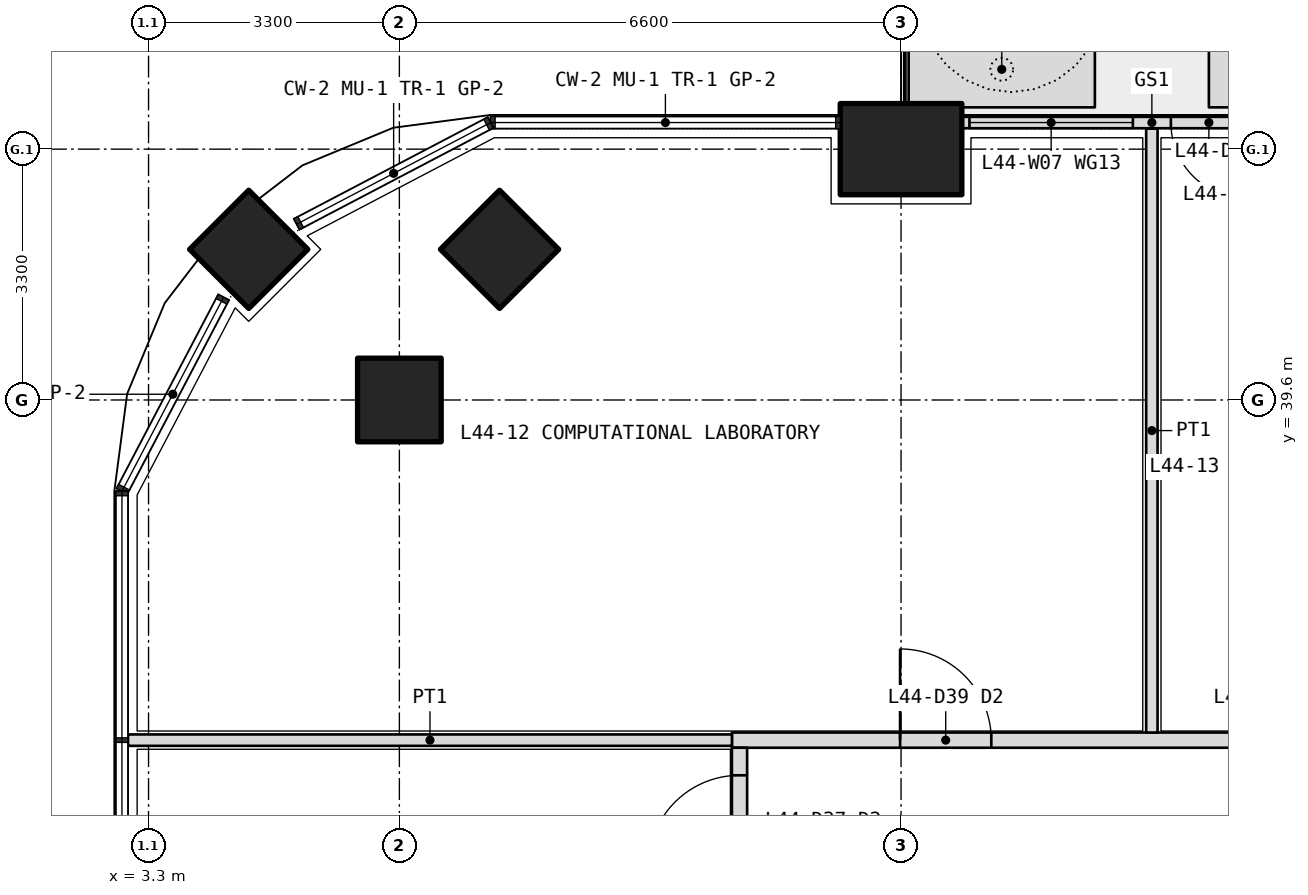
"""IFC4 building model, lengths in metres.
Left out: names, types, materials, properties, quantities, classifications, styles, units other than length and angle.
Written with IfcOpenShell. Run it as: python <this file> out.ifc"""

import sys

from ifc_helpers import new_model, si_unit, direction, frame, frame_2d, origin, origin_2d, place, context, subcontext, project, spatial, polyline, rectangle, outline, extrude, element, fill, save


model = new_model("IFC4")
c1 = context("Model", 3, precision=1e-05, world=origin(), true_north=direction((0.0, 1.0)))
c2 = subcontext(c1, "Body", "Model", "MODEL_VIEW")
j1 = project(units=[si_unit("LENGTHUNIT", "METRE"), si_unit("PLANEANGLEUNIT", "RADIAN")], contexts=[c1])
p1 = place(None, origin())
s1 = spatial("IfcSite", under=j1, at=p1, CompositionType="ELEMENT")
p2 = place(p1, origin())
s2 = spatial("IfcBuilding", under=s1, at=p2, CompositionType="ELEMENT")
p3 = place(p2, frame((0.0, 0.0, 193.5)))
s3 = spatial("IfcBuildingStorey", under=s2, at=p3, CompositionType="ELEMENT", Elevation=193.5)
p4 = place(p3, frame((4.618, 41.582, 0.0), z_axis=(0.0, 0.0, 1.0), x_axis=(0.707106781187, 0.707106781187, 0.0)))
e1 = element("IfcColumn", 1, at=p4, inside=s3, PredefinedType="COLUMN", context=c2, shape_type="SweptSolid", body=[
    extrude(rectangle(XDim=1.1, YDim=1.1, at=origin_2d()), origin(), (0.0, 0.0, 1.0), 4.2),
])
p5 = place(p3, frame((13.2, 42.9, 0.0), z_axis=(0.0, 0.0, 1.0), x_axis=(1.0, 0.0, 0.0)))
e2 = element("IfcColumn", 2, at=p5, inside=s3, PredefinedType="COLUMN", context=c2, shape_type="SweptSolid", body=[
    extrude(rectangle(XDim=1.6, YDim=1.2, at=origin_2d()), origin(), (0.0, 0.0, 1.0), 4.2),
])
for number, where, z_axis, x_axis in (
    (3, (6.6, 39.6, 0.0), (0.0, 0.0, 1.0), (1.0, 0.0, 0.0)),
    (4, (7.918, 41.582, 0.0), (0.0, 0.0, 1.0), (0.707, 0.707, 0.0)),
):
    element("IfcColumn", number, at=place(p3, frame(where, z_axis=z_axis, x_axis=x_axis)), inside=s3, PredefinedType="COLUMN", context=c2, shape_type="SweptSolid", body=[
        extrude(rectangle(XDim=1.1, YDim=1.1, at=origin_2d()), origin(), (0.0, 0.0, 1.0), 4.2),
    ])
p6 = place(p3, origin())
e5 = element("IfcWall", 5, at=p6, inside=s3, PredefinedType="USERDEFINED", context=c2, shape_type="SweptSolid", body=[
    extrude(outline(polyline([(13.3, 43.45), (15.75, 43.45), (15.75, 44.45), (13.3, 44.45), (13.3, 43.45)]), holes=[polyline([(13.45, 43.6), (15.6, 43.6), (15.6, 44.3), (13.45, 44.3), (13.45, 43.6)])]), origin(), (0.0, 0.0, 1.0), 1.05),
])
p7 = place(p3, origin())
e6 = element("IfcWall", 6, at=p7, inside=s3, PredefinedType="USERDEFINED", context=c2, shape_type="SweptSolid", body=[
    extrude(outline(polyline([(17.25, 43.45), (26.3, 43.45), (26.3, 44.45), (17.25, 44.45), (17.25, 43.45)]), holes=[polyline([(17.4, 43.6), (26.15, 43.6), (26.15, 44.3), (17.4, 44.3), (17.4, 43.6)])]), origin(), (0.0, 0.0, 1.0), 1.05),
])
p8 = place(p3, frame((19.0, 43.25, 0.0), z_axis=(0.0, 0.0, 1.0), x_axis=(-1.0, 0.0, 0.0)))
e7 = element("IfcWall", 7, at=p8, inside=s3, PredefinedType="SOLIDWALL", context=c2, shape_type="SweptSolid", body=[
    extrude(rectangle(XDim=5.0, YDim=0.15, at=frame_2d((2.5, 0.0))), origin(), (0.0, 0.0, 1.0), 2.7),
])
p9 = place(p8, frame((1.25, 0.0, 0.0)))
e8 = element("IfcOpeningElement", 8, at=p9, cuts=e7, PredefinedType="OPENING", context=c2, shape_type="SweptSolid", body=[
    extrude(rectangle(XDim=1.0, YDim=2.4, at=frame_2d((0.5, 1.2))), frame((0.0, 0.085, 0.0), z_axis=(0.0, -1.0, 0.0), x_axis=(1.0, 0.0, 0.0)), (0.0, 0.0, 1.0), 0.17),
])
p10 = place(p8, frame((0.1, 0.0, 0.1)))
e9 = element("IfcOpeningElement", 9, at=p10, cuts=e7, PredefinedType="OPENING", context=c2, shape_type="SweptSolid", body=[
    extrude(rectangle(XDim=1.05, YDim=2.3, at=frame_2d((0.525, 1.15))), frame((0.0, 0.085, 0.0), z_axis=(0.0, -1.0, 0.0), x_axis=(1.0, 0.0, 0.0)), (0.0, 0.0, 1.0), 0.17),
])
p11 = place(p8, frame((2.75, 0.0, 0.1)))
e10 = element("IfcOpeningElement", 10, at=p11, cuts=e7, PredefinedType="OPENING", context=c2, shape_type="SweptSolid", body=[
    extrude(rectangle(XDim=2.15, YDim=2.3, at=frame_2d((1.075, 1.15))), frame((0.0, 0.085, 0.0), z_axis=(0.0, -1.0, 0.0), x_axis=(1.0, 0.0, 0.0)), (0.0, 0.0, 1.0), 0.17),
])
p12 = place(p3, frame((10.975, 35.125, 0.0), z_axis=(0.0, 0.0, 1.0), x_axis=(1.0, 0.0, 0.0)))
e11 = element("IfcWall", 11, at=p12, inside=s3, PredefinedType="PARTITIONING", context=c2, shape_type="SweptSolid", body=[
    extrude(rectangle(XDim=30.85, YDim=0.2, at=frame_2d((15.425, 0.0))), origin(), (0.0, 0.0, 1.0), 2.85),
])
p13 = place(p12, frame((2.212, 0.0, 0.0)))
e12 = element("IfcOpeningElement", 12, at=p13, cuts=e11, PredefinedType="OPENING", context=c2, shape_type="SweptSolid", body=[
    extrude(rectangle(XDim=1.2, YDim=2.1, at=frame_2d((0.6, 1.05))), frame((0.0, 0.11, 0.0), z_axis=(0.0, -1.0, 0.0), x_axis=(1.0, 0.0, 0.0)), (0.0, 0.0, 1.0), 0.22),
])
p14 = place(p12, frame((6.675, 0.0, 0.0)))
e13 = element("IfcOpeningElement", 13, at=p14, cuts=e11, PredefinedType="OPENING", context=c2, shape_type="SweptSolid", body=[
    extrude(rectangle(XDim=1.0, YDim=2.1, at=frame_2d((0.5, 1.05))), frame((0.0, 0.11, 0.0), z_axis=(0.0, -1.0, 0.0), x_axis=(1.0, 0.0, 0.0)), (0.0, 0.0, 1.0), 0.22),
])
p15 = place(p12, frame((14.925, 0.0, 0.0)))
e14 = element("IfcOpeningElement", 14, at=p15, cuts=e11, PredefinedType="OPENING", context=c2, shape_type="SweptSolid", body=[
    extrude(rectangle(XDim=1.0, YDim=2.1, at=frame_2d((0.5, 1.05))), frame((0.0, 0.11, 0.0), z_axis=(0.0, -1.0, 0.0), x_axis=(1.0, 0.0, 0.0)), (0.0, 0.0, 1.0), 0.22),
])
p16 = place(p12, frame((25.788, 0.0, 0.0)))
e15 = element("IfcOpeningElement", 15, at=p16, cuts=e11, PredefinedType="OPENING", context=c2, shape_type="SweptSolid", body=[
    extrude(rectangle(XDim=1.2, YDim=2.1, at=frame_2d((0.6, 1.05))), frame((0.0, 0.11, 0.0), z_axis=(0.0, -1.0, 0.0), x_axis=(1.0, 0.0, 0.0)), (0.0, 0.0, 1.0), 0.22),
])
p17 = place(p3, frame((11.075, 11.175, 0.0), z_axis=(0.0, 0.0, 1.0), x_axis=(0.0, 1.0, 0.0)))
e16 = element("IfcWall", 16, at=p17, inside=s3, PredefinedType="PARTITIONING", context=c2, shape_type="SweptSolid", body=[
    extrude(rectangle(XDim=23.85, YDim=0.2, at=frame_2d((11.925, 0.0))), origin(), (0.0, 0.0, 1.0), 2.85),
])
p18 = place(p17, frame((0.462, 0.0, 0.0)))
e17 = element("IfcOpeningElement", 17, at=p18, cuts=e16, PredefinedType="OPENING", context=c2, shape_type="SweptSolid", body=[
    extrude(rectangle(XDim=1.0, YDim=2.1, at=frame_2d((0.5, 1.05))), frame((0.0, 0.11, 0.0), z_axis=(0.0, -1.0, 0.0), x_axis=(1.0, 0.0, 0.0)), (0.0, 0.0, 1.0), 0.22),
])
p19 = place(p17, frame((3.125, 0.0, 0.0)))
e18 = element("IfcOpeningElement", 18, at=p19, cuts=e16, PredefinedType="OPENING", context=c2, shape_type="SweptSolid", body=[
    extrude(rectangle(XDim=1.0, YDim=2.1, at=frame_2d((0.5, 1.05))), frame((0.0, 0.11, 0.0), z_axis=(0.0, -1.0, 0.0), x_axis=(1.0, 0.0, 0.0)), (0.0, 0.0, 1.0), 0.22),
])
p20 = place(p17, frame((6.475, 0.0, 0.0)))
e19 = element("IfcOpeningElement", 19, at=p20, cuts=e16, PredefinedType="OPENING", context=c2, shape_type="SweptSolid", body=[
    extrude(rectangle(XDim=0.9, YDim=2.1, at=frame_2d((0.45, 1.05))), frame((0.0, 0.11, 0.0), z_axis=(0.0, -1.0, 0.0), x_axis=(1.0, 0.0, 0.0)), (0.0, 0.0, 1.0), 0.22),
])
p21 = place(p17, frame((9.675, 0.0, 0.0)))
e20 = element("IfcOpeningElement", 20, at=p21, cuts=e16, PredefinedType="OPENING", context=c2, shape_type="SweptSolid", body=[
    extrude(rectangle(XDim=0.9, YDim=2.1, at=frame_2d((0.45, 1.05))), frame((0.0, 0.11, 0.0), z_axis=(0.0, -1.0, 0.0), x_axis=(1.0, 0.0, 0.0)), (0.0, 0.0, 1.0), 0.22),
])
p22 = place(p17, frame((12.925, 0.0, 0.0)))
e21 = element("IfcOpeningElement", 21, at=p22, cuts=e16, PredefinedType="OPENING", context=c2, shape_type="SweptSolid", body=[
    extrude(rectangle(XDim=1.0, YDim=2.1, at=frame_2d((0.5, 1.05))), frame((0.0, 0.11, 0.0), z_axis=(0.0, -1.0, 0.0), x_axis=(1.0, 0.0, 0.0)), (0.0, 0.0, 1.0), 0.22),
])
p23 = place(p17, frame((17.925, 0.0, 0.0)))
e22 = element("IfcOpeningElement", 22, at=p23, cuts=e16, PredefinedType="OPENING", context=c2, shape_type="SweptSolid", body=[
    extrude(rectangle(XDim=1.2, YDim=2.1, at=frame_2d((0.6, 1.05))), frame((0.0, 0.11, 0.0), z_axis=(0.0, -1.0, 0.0), x_axis=(1.0, 0.0, 0.0)), (0.0, 0.0, 1.0), 0.22),
])
p24 = place(p17, frame((22.288, 0.0, 0.0)))
e23 = element("IfcOpeningElement", 23, at=p24, cuts=e16, PredefinedType="OPENING", context=c2, shape_type="SweptSolid", body=[
    extrude(rectangle(XDim=1.2, YDim=2.1, at=frame_2d((0.6, 1.05))), frame((0.0, 0.11, 0.0), z_axis=(0.0, -1.0, 0.0), x_axis=(1.0, 0.0, 0.0)), (0.0, 0.0, 1.0), 0.22),
])
p25 = place(p3, frame((3.03, 35.125, 0.0), z_axis=(0.0, 0.0, 1.0), x_axis=(1.0, 0.0, 0.0)))
e24 = element("IfcWall", 24, at=p25, inside=s3, PredefinedType="PARTITIONING", context=c2, shape_type="SweptSolid", body=[
    extrude(rectangle(XDim=7.945, YDim=0.15, at=frame_2d((3.973, 0.0))), origin(), (0.0, 0.0, 1.0), 2.7),
])
p26 = place(p3, frame((16.5, 43.17, 0.0), z_axis=(0.0, 0.0, 1.0), x_axis=(0.0, -1.0, 0.0)))
e25 = element("IfcWall", 25, at=p26, inside=s3, PredefinedType="PARTITIONING", context=c2, shape_type="SweptSolid", body=[
    extrude(rectangle(XDim=7.945, YDim=0.15, at=frame_2d((3.972, 0.0))), origin(), (0.0, 0.0, 1.0), 2.7),
])
p27 = place(p9, origin())
e26 = element("IfcDoor", 26, at=p27, inside=s3, OperationType="SINGLE_SWING_LEFT", PredefinedType="DOOR", context=c2, shape_type="SweptSolid", body=[
    extrude(rectangle(XDim=1.0, YDim=2.4, at=frame_2d((0.5, 1.2))), frame((0.0, 0.025, 0.0), z_axis=(0.0, -1.0, 0.0), x_axis=(1.0, 0.0, 0.0)), (0.0, 0.0, 1.0), 0.05),
])
fill(e8, e26)
p28 = place(p11, origin())
e27 = element("IfcWindow", 27, at=p28, inside=s3, PartitioningType="SINGLE_PANEL", PredefinedType="WINDOW", context=c2, shape_type="SweptSolid", body=[
    extrude(rectangle(XDim=2.15, YDim=2.3, at=frame_2d((1.075, 1.15))), frame((0.0, 0.03, 0.0), z_axis=(0.0, -1.0, 0.0), x_axis=(1.0, 0.0, 0.0)), (0.0, 0.0, 1.0), 0.06),
])
fill(e10, e27)
p29 = place(p13, origin())
e28 = element("IfcDoor", 28, at=p29, inside=s3, OperationType="DOUBLE_DOOR_SINGLE_SWING", PredefinedType="DOOR", context=c2, shape_type="SweptSolid", body=[
    extrude(rectangle(XDim=1.2, YDim=2.1, at=frame_2d((0.6, 1.05))), frame((0.0, 0.025, 0.0), z_axis=(0.0, -1.0, 0.0), x_axis=(1.0, 0.0, 0.0)), (0.0, 0.0, 1.0), 0.05),
])
fill(e12, e28)
p30 = place(p24, origin())
e29 = element("IfcDoor", 29, at=p30, inside=s3, OperationType="DOUBLE_DOOR_SINGLE_SWING", PredefinedType="DOOR", context=c2, shape_type="SweptSolid", body=[
    extrude(rectangle(XDim=1.2, YDim=2.1, at=frame_2d((0.6, 1.05))), frame((0.0, 0.025, 0.0), z_axis=(0.0, -1.0, 0.0), x_axis=(1.0, 0.0, 0.0)), (0.0, 0.0, 1.0), 0.05),
])
fill(e23, e29)
save(model, sys.argv[1])
